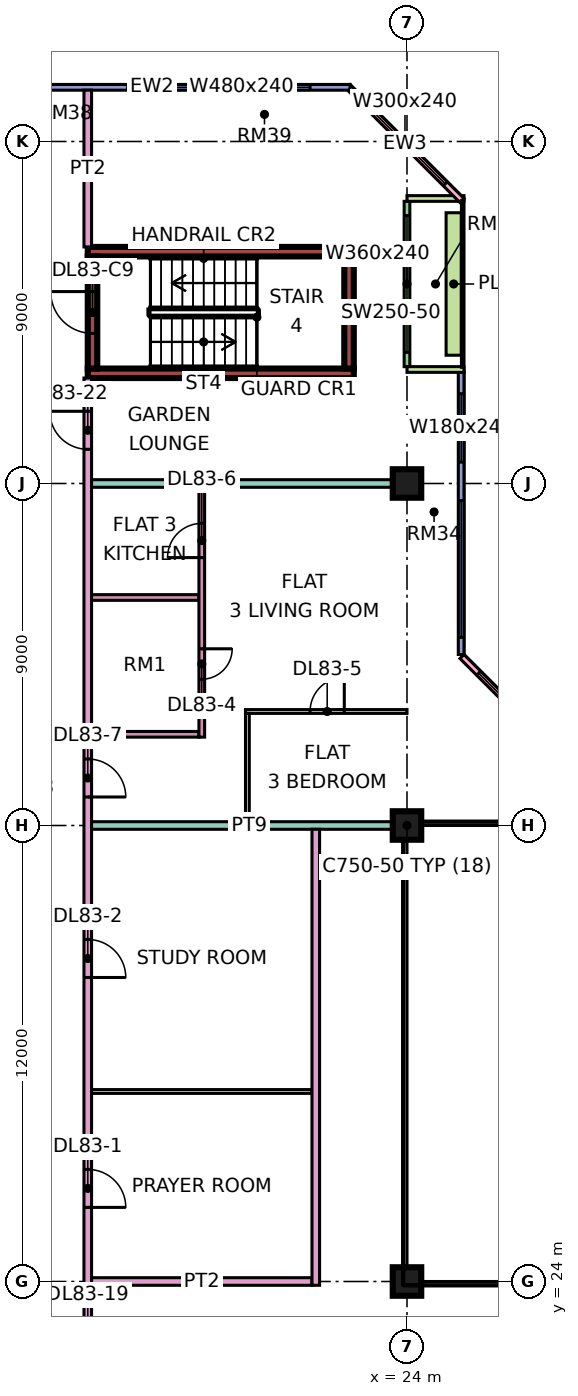
"""IFC4 building model, lengths in metres.
Left out: names, types, materials, properties, quantities, classifications, styles, units other than length and angle.
Written with IfcOpenShell. Run it as: python <this file> out.ifc"""

import sys

from ifc_helpers import new_model, si_unit, direction, frame, frame_2d, origin, origin_2d, place, context, subcontext, project, spatial, rectangle, extrude, element, fill, save


model = new_model("IFC4")
c1 = context("Model", 3, precision=1e-05, world=origin(), true_north=direction((0.0, 1.0)))
c2 = subcontext(c1, "Body", "Model", "MODEL_VIEW")
j1 = project(units=[si_unit("LENGTHUNIT", "METRE"), si_unit("PLANEANGLEUNIT", "RADIAN")], contexts=[c1])
p1 = place(None, origin())
s1 = spatial("IfcSite", under=j1, at=p1, CompositionType="ELEMENT")
p2 = place(p1, origin())
s2 = spatial("IfcBuilding", under=s1, at=p2, CompositionType="ELEMENT")
p3 = place(p2, frame((0.0, 0.0, 357.65)))
s3 = spatial("IfcBuildingStorey", under=s2, at=p3, CompositionType="ELEMENT", Elevation=357.65)
for number, where, z_axis, x_axis in (
    (1, (24.0, 24.0, 0.0), (0.0, 0.0, 1.0), (1.0, 0.0, 0.0)),
    (2, (24.0, 36.0, 0.0), (0.0, 0.0, 1.0), (1.0, 0.0, 0.0)),
    (3, (24.0, 45.0, 0.0), (0.0, 0.0, 1.0), (1.0, 0.0, 0.0)),
):
    element("IfcColumn", number, at=place(p3, frame(where, z_axis=z_axis, x_axis=x_axis)), inside=s3, PredefinedType="COLUMN", context=c2, shape_type="SweptSolid", body=[
        extrude(rectangle(XDim=0.75, YDim=0.75, at=origin_2d()), origin(), (0.0, 0.0, 1.0), 3.75),
    ])
for number, where, z_axis, x_axis in (
    (4, (15.6, 47.9, 0.0), (0.0, 0.0, 1.0), (1.0, 0.0, 0.0)),
    (5, (15.6, 51.1, 0.0), (0.0, 0.0, 1.0), (1.0, 0.0, 0.0)),
):
    element("IfcWall", number, at=place(p3, frame(where, z_axis=z_axis, x_axis=x_axis)), inside=s3, PredefinedType="SHEAR", context=c2, shape_type="SweptSolid", body=[
        extrude(rectangle(XDim=7.0, YDim=0.25, at=frame_2d((3.5, 0.0))), origin(), (0.0, 0.0, 1.0), 3.75),
    ])
p4 = place(p3, frame((15.725, 48.025, 0.0), z_axis=(0.0, 0.0, 1.0), x_axis=(0.0, 1.0, 0.0)))
e6 = element("IfcWall", 6, at=p4, inside=s3, PredefinedType="SHEAR", context=c2, shape_type="SweptSolid", body=[
    extrude(rectangle(XDim=2.95, YDim=0.25, at=frame_2d((1.475, 0.0))), origin(), (0.0, 0.0, 1.0), 3.75),
])
p5 = place(p4, frame((0.925, 0.0, 0.0)))
e7 = element("IfcOpeningElement", 7, at=p5, cuts=e6, PredefinedType="OPENING", context=c2, shape_type="SweptSolid", body=[
    extrude(rectangle(XDim=1.1, YDim=2.2, at=frame_2d((0.55, 1.1))), frame((0.0, 0.135, 0.0), z_axis=(0.0, -1.0, 0.0), x_axis=(1.0, 0.0, 0.0)), (0.0, 0.0, 1.0), 0.27),
])
p6 = place(p3, frame((22.475, 48.025, 0.0), z_axis=(0.0, 0.0, 1.0), x_axis=(0.0, 1.0, 0.0)))
e8 = element("IfcWall", 8, at=p6, inside=s3, PredefinedType="SHEAR", context=c2, shape_type="SweptSolid", body=[
    extrude(rectangle(XDim=2.95, YDim=0.25, at=frame_2d((1.475, 0.0))), origin(), (0.0, 0.0, 1.0), 3.75),
])
p7 = place(p3, frame((28.447, 37.447, 0.0), z_axis=(0.0, 0.0, 1.0), x_axis=(-0.707106781187, 0.707106781187, 0.0)))
e9 = element("IfcWall", 9, at=p7, inside=s3, PredefinedType="SOLIDWALL", context=c2, shape_type="SweptSolid", body=[
    extrude(rectangle(XDim=4.243, YDim=0.15, at=frame_2d((2.121, 0.0))), origin(), (0.0, 0.0, 1.0), 3.35),
])
p8 = place(p7, frame((0.621, 0.0, 0.45)))
e10 = element("IfcOpeningElement", 10, at=p8, cuts=e9, PredefinedType="OPENING", context=c2, shape_type="SweptSolid", body=[
    extrude(rectangle(XDim=3.0, YDim=2.4, at=frame_2d((1.5, 1.2))), frame((0.0, 0.085, 0.0), z_axis=(0.0, -1.0, 0.0), x_axis=(1.0, 0.0, 0.0)), (0.0, 0.0, 1.0), 0.17),
])
p9 = place(p3, frame((25.425, 40.5, 0.0), z_axis=(0.0, 0.0, 1.0), x_axis=(0.0, 1.0, 0.0)))
e11 = element("IfcWall", 11, at=p9, inside=s3, PredefinedType="SOLIDWALL", context=c2, shape_type="SweptSolid", body=[
    extrude(rectangle(XDim=7.425, YDim=0.15, at=frame_2d((3.712, 0.0))), origin(), (0.0, 0.0, 1.0), 3.35),
])
p10 = place(p9, frame((0.45, 0.0, 0.45)))
e12 = element("IfcOpeningElement", 12, at=p10, cuts=e11, PredefinedType="OPENING", context=c2, shape_type="SweptSolid", body=[
    extrude(rectangle(XDim=3.6, YDim=2.4, at=frame_2d((1.8, 1.2))), frame((0.0, 0.085, 0.0), z_axis=(0.0, -1.0, 0.0), x_axis=(1.0, 0.0, 0.0)), (0.0, 0.0, 1.0), 0.17),
])
p11 = place(p9, frame((5.062, 0.0, 0.45)))
e13 = element("IfcOpeningElement", 13, at=p11, cuts=e11, PredefinedType="OPENING", context=c2, shape_type="SweptSolid", body=[
    extrude(rectangle(XDim=1.8, YDim=2.4, at=frame_2d((0.9, 1.2))), frame((0.0, 0.085, 0.0), z_axis=(0.0, -1.0, 0.0), x_axis=(1.0, 0.0, 0.0)), (0.0, 0.0, 1.0), 0.17),
])
p12 = place(p3, frame((24.0, 48.075, 0.0), z_axis=(0.0, 0.0, 1.0), x_axis=(0.0, 1.0, 0.0)))
e14 = element("IfcWall", 14, at=p12, inside=s3, PredefinedType="SOLIDWALL", context=c2, shape_type="SweptSolid", body=[
    extrude(rectangle(XDim=4.35, YDim=0.15, at=frame_2d((2.175, 0.0))), origin(), (0.0, 0.0, 1.0), 3.35),
])
p13 = place(p12, frame((0.375, 0.0, 0.45)))
e15 = element("IfcOpeningElement", 15, at=p13, cuts=e14, PredefinedType="OPENING", context=c2, shape_type="SweptSolid", body=[
    extrude(rectangle(XDim=3.6, YDim=2.4, at=frame_2d((1.8, 1.2))), frame((0.0, 0.085, 0.0), z_axis=(0.0, -1.0, 0.0), x_axis=(1.0, 0.0, 0.0)), (0.0, 0.0, 1.0), 0.17),
])
for number, where, z_axis, x_axis in (
    (16, (25.5, 48.0, 0.0), (0.0, 0.0, 1.0), (-1.0, 0.0, 0.0)),
    (17, (25.5, 52.5, 0.0), (0.0, 0.0, 1.0), (-1.0, 0.0, 0.0)),
):
    element("IfcWall", number, at=place(p3, frame(where, z_axis=z_axis, x_axis=x_axis)), inside=s3, PredefinedType="SOLIDWALL", context=c2, shape_type="SweptSolid", body=[
        extrude(rectangle(XDim=1.5, YDim=0.15, at=frame_2d((0.75, 0.0))), origin(), (0.0, 0.0, 1.0), 3.35),
    ])
p14 = place(p3, frame((25.447, 52.447, 0.0), z_axis=(0.0, 0.0, 1.0), x_axis=(-0.707106781187, 0.707106781187, 0.0)))
e18 = element("IfcWall", 18, at=p14, inside=s3, PredefinedType="SOLIDWALL", context=c2, shape_type="SweptSolid", body=[
    extrude(rectangle(XDim=4.243, YDim=0.15, at=frame_2d((2.121, 0.0))), origin(), (0.0, 0.0, 1.0), 3.35),
])
p15 = place(p14, frame((0.621, 0.0, 0.45)))
e19 = element("IfcOpeningElement", 19, at=p15, cuts=e18, PredefinedType="OPENING", context=c2, shape_type="SweptSolid", body=[
    extrude(rectangle(XDim=3.0, YDim=2.4, at=frame_2d((1.5, 1.2))), frame((0.0, 0.085, 0.0), z_axis=(0.0, -1.0, 0.0), x_axis=(1.0, 0.0, 0.0)), (0.0, 0.0, 1.0), 0.17),
])
p16 = place(p3, frame((22.5, 55.425, 0.0), z_axis=(0.0, 0.0, 1.0), x_axis=(-1.0, 0.0, 0.0)))
e20 = element("IfcWall", 20, at=p16, inside=s3, PredefinedType="SOLIDWALL", context=c2, shape_type="SweptSolid", body=[
    extrude(rectangle(XDim=10.425, YDim=0.15, at=frame_2d((5.212, 0.0))), origin(), (0.0, 0.0, 1.0), 3.35),
])
p17 = place(p16, frame((1.05, 0.0, 0.45)))
e21 = element("IfcOpeningElement", 21, at=p17, cuts=e20, PredefinedType="OPENING", context=c2, shape_type="SweptSolid", body=[
    extrude(rectangle(XDim=4.8, YDim=2.4, at=frame_2d((2.4, 1.2))), frame((0.0, 0.085, 0.0), z_axis=(0.0, -1.0, 0.0), x_axis=(1.0, 0.0, 0.0)), (0.0, 0.0, 1.0), 0.17),
])
p18 = place(p3, frame((25.229, 48.375, 0.0), z_axis=(0.0, 0.0, 1.0), x_axis=(0.0, 1.0, 0.0)))
e22 = element("IfcWall", 22, at=p18, inside=s3, PredefinedType="SOLIDWALL", context=c2, shape_type="SweptSolid", body=[
    extrude(rectangle(XDim=3.75, YDim=0.4, at=frame_2d((1.875, 0.0))), origin(), (0.0, 0.0, 1.0), 0.7),
])
p19 = place(p3, frame((15.6, 20.0, 0.0), z_axis=(0.0, 0.0, 1.0), x_axis=(0.0, 1.0, 0.0)))
e23 = element("IfcWall", 23, at=p19, inside=s3, PredefinedType="PARTITIONING", context=c2, shape_type="SweptSolid", body=[
    extrude(rectangle(XDim=27.775, YDim=0.2, at=frame_2d((13.887, 0.0))), origin(), (0.0, 0.0, 1.0), 3.35),
])
p20 = place(p19, frame((5.95, 0.0, 0.0)))
e24 = element("IfcOpeningElement", 24, at=p20, cuts=e23, PredefinedType="OPENING", context=c2, shape_type="SweptSolid", body=[
    extrude(rectangle(XDim=1.0, YDim=2.1, at=frame_2d((0.5, 1.05))), frame((0.0, 0.11, 0.0), z_axis=(0.0, -1.0, 0.0), x_axis=(1.0, 0.0, 0.0)), (0.0, 0.0, 1.0), 0.22),
])
p21 = place(p19, frame((12.0, 0.0, 0.0)))
e25 = element("IfcOpeningElement", 25, at=p21, cuts=e23, PredefinedType="OPENING", context=c2, shape_type="SweptSolid", body=[
    extrude(rectangle(XDim=1.0, YDim=2.1, at=frame_2d((0.5, 1.05))), frame((0.0, 0.11, 0.0), z_axis=(0.0, -1.0, 0.0), x_axis=(1.0, 0.0, 0.0)), (0.0, 0.0, 1.0), 0.22),
])
p22 = place(p19, frame((16.75, 0.0, 0.0)))
e26 = element("IfcOpeningElement", 26, at=p22, cuts=e23, PredefinedType="OPENING", context=c2, shape_type="SweptSolid", body=[
    extrude(rectangle(XDim=1.0, YDim=2.1, at=frame_2d((0.5, 1.05))), frame((0.0, 0.11, 0.0), z_axis=(0.0, -1.0, 0.0), x_axis=(1.0, 0.0, 0.0)), (0.0, 0.0, 1.0), 0.22),
])
p23 = place(p19, frame((1.15, 0.0, 0.0)))
e27 = element("IfcOpeningElement", 27, at=p23, cuts=e23, PredefinedType="OPENING", context=c2, shape_type="SweptSolid", body=[
    extrude(rectangle(XDim=1.8, YDim=2.1, at=frame_2d((0.9, 1.05))), frame((0.0, 0.11, 0.0), z_axis=(0.0, -1.0, 0.0), x_axis=(1.0, 0.0, 0.0)), (0.0, 0.0, 1.0), 0.22),
])
p24 = place(p19, frame((25.9, 0.0, 0.0)))
e28 = element("IfcOpeningElement", 28, at=p24, cuts=e23, PredefinedType="OPENING", context=c2, shape_type="SweptSolid", body=[
    extrude(rectangle(XDim=1.0, YDim=2.1, at=frame_2d((0.5, 1.05))), frame((0.0, 0.11, 0.0), z_axis=(0.0, -1.0, 0.0), x_axis=(1.0, 0.0, 0.0)), (0.0, 0.0, 1.0), 0.22),
])
p25 = place(p3, frame((15.6, 51.225, 0.0), z_axis=(0.0, 0.0, 1.0), x_axis=(0.0, 1.0, 0.0)))
e29 = element("IfcWall", 29, at=p25, inside=s3, PredefinedType="PARTITIONING", context=c2, shape_type="SweptSolid", body=[
    extrude(rectangle(XDim=4.125, YDim=0.2, at=frame_2d((2.062, 0.0))), origin(), (0.0, 0.0, 1.0), 3.35),
])
p26 = place(p3, frame((15.7, 24.0, 0.0), z_axis=(0.0, 0.0, 1.0), x_axis=(1.0, 0.0, 0.0)))
e30 = element("IfcWall", 30, at=p26, inside=s3, PredefinedType="PARTITIONING", context=c2, shape_type="SweptSolid", body=[
    extrude(rectangle(XDim=5.8, YDim=0.2, at=frame_2d((2.9, 0.0))), origin(), (0.0, 0.0, 1.0), 3.35),
])
p27 = place(p3, frame((15.7, 29.0, 0.0), z_axis=(0.0, 0.0, 1.0), x_axis=(1.0, 0.0, 0.0)))
e31 = element("IfcWall", 31, at=p27, inside=s3, PredefinedType="PARTITIONING", context=c2, shape_type="SweptSolid", body=[
    extrude(rectangle(XDim=5.8, YDim=0.1, at=frame_2d((2.9, 0.0))), origin(), (0.0, 0.0, 1.0), 3.35),
])
p28 = place(p3, frame((15.7, 36.0, 0.0), z_axis=(0.0, 0.0, 1.0), x_axis=(1.0, 0.0, 0.0)))
e32 = element("IfcWall", 32, at=p28, inside=s3, PredefinedType="PARTITIONING", context=c2, shape_type="SweptSolid", body=[
    extrude(rectangle(XDim=8.3, YDim=0.2, at=frame_2d((4.15, 0.0))), origin(), (0.0, 0.0, 1.0), 3.35),
])
for number, where, z_axis, x_axis in (
    (33, (15.7, 38.4, 0.0), (0.0, 0.0, 1.0), (1.0, 0.0, 0.0)),
    (34, (15.7, 42.0, 0.0), (0.0, 0.0, 1.0), (1.0, 0.0, 0.0)),
):
    element("IfcWall", number, at=place(p3, frame(where, z_axis=z_axis, x_axis=x_axis)), inside=s3, PredefinedType="PARTITIONING", context=c2, shape_type="SweptSolid", body=[
        extrude(rectangle(XDim=2.825, YDim=0.15, at=frame_2d((1.413, 0.0))), origin(), (0.0, 0.0, 1.0), 3.35),
    ])
p29 = place(p3, frame((15.7, 45.0, 0.0), z_axis=(0.0, 0.0, 1.0), x_axis=(1.0, 0.0, 0.0)))
e35 = element("IfcWall", 35, at=p29, inside=s3, PredefinedType="PARTITIONING", context=c2, shape_type="SweptSolid", body=[
    extrude(rectangle(XDim=8.3, YDim=0.2, at=frame_2d((4.15, 0.0))), origin(), (0.0, 0.0, 1.0), 3.35),
])
p30 = place(p3, frame((18.6, 38.325, 0.0), z_axis=(0.0, 0.0, 1.0), x_axis=(0.0, 1.0, 0.0)))
e36 = element("IfcWall", 36, at=p30, inside=s3, PredefinedType="PARTITIONING", context=c2, shape_type="SweptSolid", body=[
    extrude(rectangle(XDim=6.575, YDim=0.15, at=frame_2d((3.288, 0.0))), origin(), (0.0, 0.0, 1.0), 3.35),
])
p31 = place(p30, frame((1.525, 0.0, 0.0)))
e37 = element("IfcOpeningElement", 37, at=p31, cuts=e36, PredefinedType="OPENING", context=c2, shape_type="SweptSolid", body=[
    extrude(rectangle(XDim=0.8, YDim=2.1, at=frame_2d((0.4, 1.05))), frame((0.0, 0.085, 0.0), z_axis=(0.0, -1.0, 0.0), x_axis=(1.0, 0.0, 0.0)), (0.0, 0.0, 1.0), 0.17),
])
p32 = place(p30, frame((4.725, 0.0, 0.0)))
e38 = element("IfcOpeningElement", 38, at=p32, cuts=e36, PredefinedType="OPENING", context=c2, shape_type="SweptSolid", body=[
    extrude(rectangle(XDim=0.9, YDim=2.1, at=frame_2d((0.45, 1.05))), frame((0.0, 0.085, 0.0), z_axis=(0.0, -1.0, 0.0), x_axis=(1.0, 0.0, 0.0)), (0.0, 0.0, 1.0), 0.17),
])
p33 = place(p3, frame((19.75, 39.0, 0.0), z_axis=(0.0, 0.0, 1.0), x_axis=(1.0, 0.0, 0.0)))
e39 = element("IfcWall", 39, at=p33, inside=s3, PredefinedType="PARTITIONING", context=c2, shape_type="SweptSolid", body=[
    extrude(rectangle(XDim=4.25, YDim=0.1, at=frame_2d((2.125, 0.0))), origin(), (0.0, 0.0, 1.0), 3.35),
])
p34 = place(p33, frame((1.7, 0.0, 0.0)))
e40 = element("IfcOpeningElement", 40, at=p34, cuts=e39, PredefinedType="OPENING", context=c2, shape_type="SweptSolid", body=[
    extrude(rectangle(XDim=0.9, YDim=2.1, at=frame_2d((0.45, 1.05))), frame((0.0, 0.06, 0.0), z_axis=(0.0, -1.0, 0.0), x_axis=(1.0, 0.0, 0.0)), (0.0, 0.0, 1.0), 0.12),
])
p35 = place(p3, frame((19.8, 36.1, 0.0), z_axis=(0.0, 0.0, 1.0), x_axis=(0.0, 1.0, 0.0)))
e41 = element("IfcWall", 41, at=p35, inside=s3, PredefinedType="PARTITIONING", context=c2, shape_type="SweptSolid", body=[
    extrude(rectangle(XDim=2.85, YDim=0.1, at=frame_2d((1.425, 0.0))), origin(), (0.0, 0.0, 1.0), 3.35),
])
p36 = place(p3, frame((21.6, 23.9, 0.0), z_axis=(0.0, 0.0, 1.0), x_axis=(0.0, 1.0, 0.0)))
e42 = element("IfcWall", 42, at=p36, inside=s3, PredefinedType="PARTITIONING", context=c2, shape_type="SweptSolid", body=[
    extrude(rectangle(XDim=12.0, YDim=0.2, at=frame_2d((6.0, 0.0))), origin(), (0.0, 0.0, 1.0), 3.35),
])
p37 = place(p8, origin())
e43 = element("IfcWindow", 43, at=p37, inside=s3, PartitioningType="SINGLE_PANEL", PredefinedType="WINDOW", context=c2, shape_type="SweptSolid", body=[
    extrude(rectangle(XDim=3.0, YDim=2.4, at=frame_2d((1.5, 1.2))), frame((0.0, 0.03, 0.0), z_axis=(0.0, -1.0, 0.0), x_axis=(1.0, 0.0, 0.0)), (0.0, 0.0, 1.0), 0.06),
])
fill(e10, e43)
p38 = place(p10, origin())
e44 = element("IfcWindow", 44, at=p38, inside=s3, PartitioningType="SINGLE_PANEL", PredefinedType="WINDOW", context=c2, shape_type="SweptSolid", body=[
    extrude(rectangle(XDim=3.6, YDim=2.4, at=frame_2d((1.8, 1.2))), frame((0.0, 0.03, 0.0), z_axis=(0.0, -1.0, 0.0), x_axis=(1.0, 0.0, 0.0)), (0.0, 0.0, 1.0), 0.06),
])
fill(e12, e44)
p39 = place(p11, origin())
e45 = element("IfcWindow", 45, at=p39, inside=s3, PartitioningType="SINGLE_PANEL", PredefinedType="WINDOW", context=c2, shape_type="SweptSolid", body=[
    extrude(rectangle(XDim=1.8, YDim=2.4, at=frame_2d((0.9, 1.2))), frame((0.0, 0.03, 0.0), z_axis=(0.0, -1.0, 0.0), x_axis=(1.0, 0.0, 0.0)), (0.0, 0.0, 1.0), 0.06),
])
fill(e13, e45)
p40 = place(p13, origin())
e46 = element("IfcWindow", 46, at=p40, inside=s3, PartitioningType="SINGLE_PANEL", PredefinedType="WINDOW", context=c2, shape_type="SweptSolid", body=[
    extrude(rectangle(XDim=3.6, YDim=2.4, at=frame_2d((1.8, 1.2))), frame((0.0, 0.03, 0.0), z_axis=(0.0, -1.0, 0.0), x_axis=(1.0, 0.0, 0.0)), (0.0, 0.0, 1.0), 0.06),
])
fill(e15, e46)
p41 = place(p15, origin())
e47 = element("IfcWindow", 47, at=p41, inside=s3, PartitioningType="SINGLE_PANEL", PredefinedType="WINDOW", context=c2, shape_type="SweptSolid", body=[
    extrude(rectangle(XDim=3.0, YDim=2.4, at=frame_2d((1.5, 1.2))), frame((0.0, 0.03, 0.0), z_axis=(0.0, -1.0, 0.0), x_axis=(1.0, 0.0, 0.0)), (0.0, 0.0, 1.0), 0.06),
])
fill(e19, e47)
p42 = place(p17, origin())
e48 = element("IfcWindow", 48, at=p42, inside=s3, PartitioningType="SINGLE_PANEL", PredefinedType="WINDOW", context=c2, shape_type="SweptSolid", body=[
    extrude(rectangle(XDim=4.8, YDim=2.4, at=frame_2d((2.4, 1.2))), frame((0.0, 0.03, 0.0), z_axis=(0.0, -1.0, 0.0), x_axis=(1.0, 0.0, 0.0)), (0.0, 0.0, 1.0), 0.06),
])
fill(e21, e48)
p43 = place(p5, frame((1.1, 0.0, 0.0), z_axis=(0.0, 0.0, 1.0), x_axis=(-1.0, 0.0, 0.0)))
e49 = element("IfcDoor", 49, at=p43, inside=s3, OperationType="SINGLE_SWING_RIGHT", PredefinedType="DOOR", context=c2, shape_type="SweptSolid", body=[
    extrude(rectangle(XDim=1.1, YDim=2.2, at=frame_2d((0.55, 1.1))), frame((0.0, 0.025, 0.0), z_axis=(0.0, -1.0, 0.0), x_axis=(1.0, 0.0, 0.0)), (0.0, 0.0, 1.0), 0.05),
])
fill(e7, e49)
p44 = place(p20, frame((1.0, 0.0, 0.0), z_axis=(0.0, 0.0, 1.0), x_axis=(-1.0, 0.0, 0.0)))
e50 = element("IfcDoor", 50, at=p44, inside=s3, OperationType="SINGLE_SWING_LEFT", PredefinedType="DOOR", context=c2, shape_type="SweptSolid", body=[
    extrude(rectangle(XDim=1.0, YDim=2.1, at=frame_2d((0.5, 1.05))), frame((0.0, 0.025, 0.0), z_axis=(0.0, -1.0, 0.0), x_axis=(1.0, 0.0, 0.0)), (0.0, 0.0, 1.0), 0.05),
])
fill(e24, e50)
p45 = place(p21, frame((1.0, 0.0, 0.0), z_axis=(0.0, 0.0, 1.0), x_axis=(-1.0, 0.0, 0.0)))
e51 = element("IfcDoor", 51, at=p45, inside=s3, OperationType="SINGLE_SWING_LEFT", PredefinedType="DOOR", context=c2, shape_type="SweptSolid", body=[
    extrude(rectangle(XDim=1.0, YDim=2.1, at=frame_2d((0.5, 1.05))), frame((0.0, 0.025, 0.0), z_axis=(0.0, -1.0, 0.0), x_axis=(1.0, 0.0, 0.0)), (0.0, 0.0, 1.0), 0.05),
])
fill(e25, e51)
p46 = place(p31, origin())
e52 = element("IfcDoor", 52, at=p46, inside=s3, OperationType="SINGLE_SWING_RIGHT", PredefinedType="DOOR", context=c2, shape_type="SweptSolid", body=[
    extrude(rectangle(XDim=0.8, YDim=2.1, at=frame_2d((0.4, 1.05))), frame((0.0, 0.025, 0.0), z_axis=(0.0, -1.0, 0.0), x_axis=(1.0, 0.0, 0.0)), (0.0, 0.0, 1.0), 0.05),
])
fill(e37, e52)
p47 = place(p34, frame((0.9, 0.0, 0.0), z_axis=(0.0, 0.0, 1.0), x_axis=(-1.0, 0.0, 0.0)))
e53 = element("IfcDoor", 53, at=p47, inside=s3, OperationType="SINGLE_SWING_RIGHT", PredefinedType="DOOR", context=c2, shape_type="SweptSolid", body=[
    extrude(rectangle(XDim=0.9, YDim=2.1, at=frame_2d((0.45, 1.05))), frame((0.0, 0.025, 0.0), z_axis=(0.0, -1.0, 0.0), x_axis=(1.0, 0.0, 0.0)), (0.0, 0.0, 1.0), 0.05),
])
fill(e40, e53)
p48 = place(p32, origin())
e54 = element("IfcDoor", 54, at=p48, inside=s3, OperationType="SINGLE_SWING_LEFT", PredefinedType="DOOR", context=c2, shape_type="SweptSolid", body=[
    extrude(rectangle(XDim=0.9, YDim=2.1, at=frame_2d((0.45, 1.05))), frame((0.0, 0.025, 0.0), z_axis=(0.0, -1.0, 0.0), x_axis=(1.0, 0.0, 0.0)), (0.0, 0.0, 1.0), 0.05),
])
fill(e38, e54)
p49 = place(p22, frame((1.0, 0.0, 0.0), z_axis=(0.0, 0.0, 1.0), x_axis=(-1.0, 0.0, 0.0)))
e55 = element("IfcDoor", 55, at=p49, inside=s3, OperationType="SINGLE_SWING_LEFT", PredefinedType="DOOR", context=c2, shape_type="SweptSolid", body=[
    extrude(rectangle(XDim=1.0, YDim=2.1, at=frame_2d((0.5, 1.05))), frame((0.0, 0.025, 0.0), z_axis=(0.0, -1.0, 0.0), x_axis=(1.0, 0.0, 0.0)), (0.0, 0.0, 1.0), 0.05),
])
fill(e26, e55)
p50 = place(p24, frame((1.0, 0.0, 0.0), z_axis=(0.0, 0.0, 1.0), x_axis=(-1.0, 0.0, 0.0)))
e56 = element("IfcDoor", 56, at=p50, inside=s3, OperationType="SINGLE_SWING_RIGHT", PredefinedType="DOOR", context=c2, shape_type="SweptSolid", body=[
    extrude(rectangle(XDim=1.0, YDim=2.1, at=frame_2d((0.5, 1.05))), frame((0.0, 0.025, 0.0), z_axis=(0.0, -1.0, 0.0), x_axis=(1.0, 0.0, 0.0)), (0.0, 0.0, 1.0), 0.05),
])
fill(e28, e56)
save(model, sys.argv[1])
